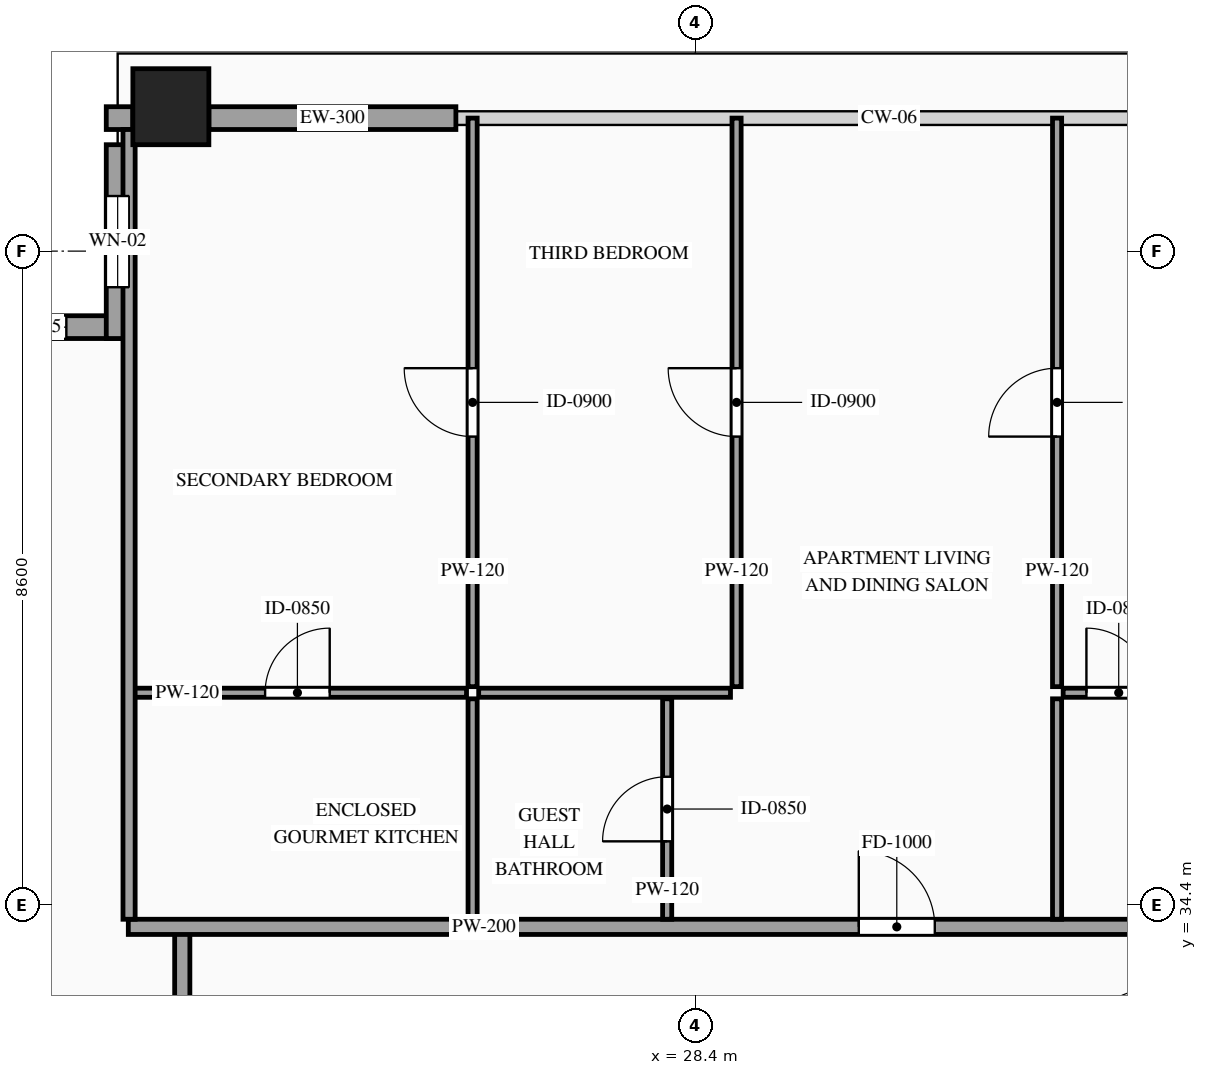
"""IFC4 building model, lengths in metres.
Left out: names, types, materials, properties, quantities, classifications, styles, units other than length and angle.
Written with IfcOpenShell. Run it as: python <this file> out.ifc"""

import sys

from ifc_helpers import new_model, si_unit, direction, frame, frame_2d, origin, origin_2d, place, context, subcontext, project, spatial, rectangle, hollow_rectangle, extrude, source, transform, mapped, element, fill, save


model = new_model("IFC4")
c1 = context("Model", 3, precision=1e-05, world=origin(), true_north=direction((0.0, 1.0)))
c2 = subcontext(c1, "Body", "Model", "MODEL_VIEW")
j1 = project(units=[si_unit("LENGTHUNIT", "METRE"), si_unit("PLANEANGLEUNIT", "RADIAN")], contexts=[c1])
p1 = place(None, origin())
s1 = spatial("IfcSite", under=j1, at=p1, CompositionType="ELEMENT")
p2 = place(p1, origin())
s2 = spatial("IfcBuilding", under=s1, at=p2, CompositionType="ELEMENT")
p3 = place(p2, frame((0.0, 0.0, 285.6)))
s3 = spatial("IfcBuildingStorey", under=s2, at=p3, CompositionType="ELEMENT", Elevation=285.6)
m1 = source(origin(), c2, "Body", "SweptSolid", [
    extrude(hollow_rectangle(XDim=1.0, YDim=1.0, WallThickness=0.048, at=origin_2d()), origin(), (0.0, 0.0, 1.0), 3.5),
])
p4 = place(p3, frame((21.5, 44.9, 0.0), z_axis=(0.0, 0.0, 1.0), x_axis=(1.0, 0.0, 0.0)))
e1 = element("IfcColumn", 1, at=p4, inside=s3, PredefinedType="COLUMN", context=c2, shape_type="MappedRepresentation", body=[
    mapped(m1, transform((0.0, 0.0, 0.0), scale=1.0)),
])
p5 = place(p3, frame((20.95, 42.0, 0.0), z_axis=(0.0, 0.0, 1.0), x_axis=(-1.0, 0.0, 0.0)))
e2 = element("IfcWall", 2, at=p5, inside=s3, PredefinedType="SOLIDWALL", context=c2, shape_type="SweptSolid", body=[
    extrude(rectangle(XDim=2.55, YDim=0.3, at=frame_2d((1.275, 0.0))), origin(), (0.0, 0.0, 1.0), 3.28),
])
p6 = place(p5, frame((0.825, 0.0, 0.85)))
e3 = element("IfcOpeningElement", 3, at=p6, cuts=e2, PredefinedType="OPENING", context=c2, shape_type="SweptSolid", body=[
    extrude(rectangle(XDim=0.9, YDim=1.5, at=frame_2d((0.45, 0.75))), frame((0.0, 0.165, 0.0), z_axis=(0.0, -1.0, 0.0), x_axis=(1.0, 0.0, 0.0)), (0.0, 0.0, 1.0), 0.33),
])
p7 = place(p3, frame((20.8, 44.4, 0.0), z_axis=(0.0, 0.0, 1.0), x_axis=(0.0, -1.0, 0.0)))
e4 = element("IfcWall", 4, at=p7, inside=s3, PredefinedType="SOLIDWALL", context=c2, shape_type="SweptSolid", body=[
    extrude(rectangle(XDim=2.55, YDim=0.3, at=frame_2d((1.275, 0.0))), origin(), (0.0, 0.0, 1.0), 3.28),
])
p8 = place(p7, frame((0.675, 0.0, 0.85)))
e5 = element("IfcOpeningElement", 5, at=p8, cuts=e4, PredefinedType="OPENING", context=c2, shape_type="SweptSolid", body=[
    extrude(rectangle(XDim=1.2, YDim=2.1, at=frame_2d((0.6, 1.05))), frame((0.0, 0.165, 0.0), z_axis=(0.0, -1.0, 0.0), x_axis=(1.0, 0.0, 0.0)), (0.0, 0.0, 1.0), 0.33),
])
m2 = source(origin(), c2, "Body", "SweptSolid", [
    extrude(rectangle(XDim=0.35, YDim=0.3, at=frame_2d((0.175, 0.0))), origin(), (0.0, 0.0, 1.0), 3.28),
])
p9 = place(p3, frame((20.65, 44.75, 0.0), z_axis=(0.0, 0.0, 1.0), x_axis=(1.0, 0.0, 0.0)))
e6 = element("IfcWall", 6, at=p9, inside=s3, PredefinedType="SOLIDWALL", context=c2, shape_type="MappedRepresentation", body=[
    mapped(m2, transform((0.0, 0.0, 0.0), scale=1.0)),
])
m3 = source(origin(), c2, "Body", "SweptSolid", [
    extrude(rectangle(XDim=3.25, YDim=0.3, at=frame_2d((1.625, 0.0))), origin(), (0.0, 0.0, 1.0), 2.885),
])
p10 = place(p3, frame((22.0, 44.75, 0.0), z_axis=(0.0, 0.0, 1.0), x_axis=(1.0, 0.0, 0.0)))
e7 = element("IfcWall", 7, at=p10, inside=s3, PredefinedType="SOLIDWALL", context=c2, shape_type="MappedRepresentation", body=[
    mapped(m3, transform((0.0, 0.0, 0.0), scale=1.0)),
])
m4 = source(origin(), c2, "Body", "SweptSolid", [
    extrude(rectangle(XDim=1.7, YDim=0.2, at=frame_2d((0.85, 0.0))), origin(), (0.0, 0.0, 1.0), 3.28),
])
p11 = place(p3, frame((21.65, 32.35, 0.0), z_axis=(0.0, 0.0, 1.0), x_axis=(0.0, 1.0, 0.0)))
e8 = element("IfcWall", 8, at=p11, inside=s3, PredefinedType="PARTITIONING", context=c2, shape_type="MappedRepresentation", body=[
    mapped(m4, transform((0.0, 0.0, 0.0), scale=1.0)),
])
p12 = place(p3, frame((20.94, 34.11, 0.0), z_axis=(0.0, 0.0, 1.0), x_axis=(1.0, 0.0, 0.0)))
e9 = element("IfcWall", 9, at=p12, inside=s3, PredefinedType="PARTITIONING", context=c2, shape_type="SweptSolid", body=[
    extrude(rectangle(XDim=16.622, YDim=0.2, at=frame_2d((8.311, 0.0))), origin(), (0.0, 0.0, 1.0), 3.28),
])
p13 = place(p12, frame((9.611, 0.0, 0.0)))
e10 = element("IfcOpeningElement", 10, at=p13, cuts=e9, PredefinedType="OPENING", context=c2, shape_type="SweptSolid", body=[
    extrude(rectangle(XDim=1.0, YDim=2.2, at=frame_2d((0.5, 1.1))), frame((0.0, 0.115, 0.0), z_axis=(0.0, -1.0, 0.0), x_axis=(1.0, 0.0, 0.0)), (0.0, 0.0, 1.0), 0.23),
])
p14 = place(p3, frame((20.94, 37.19, 0.0), z_axis=(0.0, 0.0, 1.0), x_axis=(1.0, 0.0, 0.0)))
e11 = element("IfcWall", 11, at=p14, inside=s3, PredefinedType="PARTITIONING", context=c2, shape_type="SweptSolid", body=[
    extrude(rectangle(XDim=4.45, YDim=0.12, at=frame_2d((2.225, 0.0))), origin(), (0.0, 0.0, 1.0), 3.28),
])
p15 = place(p14, frame((1.8, 0.0, 0.0)))
e12 = element("IfcOpeningElement", 12, at=p15, cuts=e11, PredefinedType="OPENING", context=c2, shape_type="SweptSolid", body=[
    extrude(rectangle(XDim=0.85, YDim=2.1, at=frame_2d((0.425, 1.05))), frame((0.0, 0.075, 0.0), z_axis=(0.0, -1.0, 0.0), x_axis=(1.0, 0.0, 0.0)), (0.0, 0.0, 1.0), 0.15),
])
m5 = source(origin(), c2, "Body", "SweptSolid", [
    extrude(rectangle(XDim=2.9, YDim=0.12, at=frame_2d((1.45, 0.0))), origin(), (0.0, 0.0, 1.0), 3.28),
])
p16 = place(p3, frame((25.47, 34.21, 0.0), z_axis=(0.0, 0.0, 1.0), x_axis=(0.0, 1.0, 0.0)))
e13 = element("IfcWall", 13, at=p16, inside=s3, PredefinedType="PARTITIONING", context=c2, shape_type="MappedRepresentation", body=[
    mapped(m5, transform((0.0, 0.0, 0.0), scale=1.0)),
])
p17 = place(p3, frame((28.03, 34.21, 0.0), z_axis=(0.0, 0.0, 1.0), x_axis=(0.0, 1.0, 0.0)))
e14 = element("IfcWall", 14, at=p17, inside=s3, PredefinedType="PARTITIONING", context=c2, shape_type="SweptSolid", body=[
    extrude(rectangle(XDim=2.9, YDim=0.12, at=frame_2d((1.45, 0.0))), origin(), (0.0, 0.0, 1.0), 3.28),
])
p18 = place(p17, frame((1.025, 0.0, 0.0)))
e15 = element("IfcOpeningElement", 15, at=p18, cuts=e14, PredefinedType="OPENING", context=c2, shape_type="SweptSolid", body=[
    extrude(rectangle(XDim=0.85, YDim=2.1, at=frame_2d((0.425, 1.05))), frame((0.0, 0.075, 0.0), z_axis=(0.0, -1.0, 0.0), x_axis=(1.0, 0.0, 0.0)), (0.0, 0.0, 1.0), 0.15),
])
p19 = place(p3, frame((33.16, 34.21, 0.0), z_axis=(0.0, 0.0, 1.0), x_axis=(0.0, 1.0, 0.0)))
e16 = element("IfcWall", 16, at=p19, inside=s3, PredefinedType="PARTITIONING", context=c2, shape_type="MappedRepresentation", body=[
    mapped(m5, transform((0.0, 0.0, 0.0), scale=1.0)),
])
p20 = place(p3, frame((25.47, 37.27, 0.0), z_axis=(0.0, 0.0, 1.0), x_axis=(0.0, 1.0, 0.0)))
e17 = element("IfcWall", 17, at=p20, inside=s3, PredefinedType="PARTITIONING", context=c2, shape_type="SweptSolid", body=[
    extrude(rectangle(XDim=7.48, YDim=0.12, at=frame_2d((3.74, 0.0))), origin(), (0.0, 0.0, 1.0), 3.28),
])
p21 = place(p20, frame((3.29, 0.0, 0.0)))
e18 = element("IfcOpeningElement", 18, at=p21, cuts=e17, PredefinedType="OPENING", context=c2, shape_type="SweptSolid", body=[
    extrude(rectangle(XDim=0.9, YDim=2.15, at=frame_2d((0.45, 1.075))), frame((0.0, 0.075, 0.0), z_axis=(0.0, -1.0, 0.0), x_axis=(1.0, 0.0, 0.0)), (0.0, 0.0, 1.0), 0.15),
])
p22 = place(p3, frame((33.24, 37.19, 0.0), z_axis=(0.0, 0.0, 1.0), x_axis=(1.0, 0.0, 0.0)))
e19 = element("IfcWall", 19, at=p22, inside=s3, PredefinedType="PARTITIONING", context=c2, shape_type="SweptSolid", body=[
    extrude(rectangle(XDim=4.322, YDim=0.12, at=frame_2d((2.161, 0.0))), origin(), (0.0, 0.0, 1.0), 3.28),
])
p23 = place(p22, frame((2.547, 0.0, 0.0)))
e20 = element("IfcOpeningElement", 20, at=p23, cuts=e19, PredefinedType="OPENING", context=c2, shape_type="SweptSolid", body=[
    extrude(rectangle(XDim=0.85, YDim=2.1, at=frame_2d((0.425, 1.05))), frame((0.0, 0.075, 0.0), z_axis=(0.0, -1.0, 0.0), x_axis=(1.0, 0.0, 0.0)), (0.0, 0.0, 1.0), 0.15),
])
p24 = place(p22, frame((0.306, 0.0, 0.0)))
e21 = element("IfcOpeningElement", 21, at=p24, cuts=e19, PredefinedType="OPENING", context=c2, shape_type="SweptSolid", body=[
    extrude(rectangle(XDim=0.85, YDim=2.1, at=frame_2d((0.425, 1.05))), frame((0.0, 0.075, 0.0), z_axis=(0.0, -1.0, 0.0), x_axis=(1.0, 0.0, 0.0)), (0.0, 0.0, 1.0), 0.15),
])
p25 = place(p3, frame((33.16, 37.27, 0.0), z_axis=(0.0, 0.0, 1.0), x_axis=(0.0, 1.0, 0.0)))
e22 = element("IfcWall", 22, at=p25, inside=s3, PredefinedType="PARTITIONING", context=c2, shape_type="SweptSolid", body=[
    extrude(rectangle(XDim=7.48, YDim=0.12, at=frame_2d((3.74, 0.0))), origin(), (0.0, 0.0, 1.0), 3.28),
])
p26 = place(p25, frame((3.29, 0.0, 0.0)))
e23 = element("IfcOpeningElement", 23, at=p26, cuts=e22, PredefinedType="OPENING", context=c2, shape_type="SweptSolid", body=[
    extrude(rectangle(XDim=0.9, YDim=2.15, at=frame_2d((0.45, 1.075))), frame((0.0, 0.075, 0.0), z_axis=(0.0, -1.0, 0.0), x_axis=(1.0, 0.0, 0.0)), (0.0, 0.0, 1.0), 0.15),
])
m6 = source(origin(), c2, "Body", "SweptSolid", [
    extrude(rectangle(XDim=3.313, YDim=0.12, at=frame_2d((1.656, 0.0))), origin(), (0.0, 0.0, 1.0), 3.28),
])
p27 = place(p3, frame((25.55, 37.19, 0.0), z_axis=(0.0, 0.0, 1.0), x_axis=(1.0, 0.0, 0.0)))
e24 = element("IfcWall", 24, at=p27, inside=s3, PredefinedType="PARTITIONING", context=c2, shape_type="MappedRepresentation", body=[
    mapped(m6, transform((0.0, 0.0, 0.0), scale=1.0)),
])
p28 = place(p3, frame((28.943, 37.27, 0.0), z_axis=(0.0, 0.0, 1.0), x_axis=(0.0, 1.0, 0.0)))
e25 = element("IfcWall", 25, at=p28, inside=s3, PredefinedType="PARTITIONING", context=c2, shape_type="SweptSolid", body=[
    extrude(rectangle(XDim=7.48, YDim=0.12, at=frame_2d((3.74, 0.0))), origin(), (0.0, 0.0, 1.0), 3.28),
])
p29 = place(p28, frame((3.29, 0.0, 0.0)))
e26 = element("IfcOpeningElement", 26, at=p29, cuts=e25, PredefinedType="OPENING", context=c2, shape_type="SweptSolid", body=[
    extrude(rectangle(XDim=0.9, YDim=2.15, at=frame_2d((0.45, 1.075))), frame((0.0, 0.075, 0.0), z_axis=(0.0, -1.0, 0.0), x_axis=(1.0, 0.0, 0.0)), (0.0, 0.0, 1.0), 0.15),
])
m7 = source(origin(), c2, "Body", "SweptSolid", [
    extrude(rectangle(XDim=10.39, YDim=0.16, at=frame_2d((5.195, 0.0))), origin(), (0.0, 0.0, 1.0), 3.28),
])
p30 = place(p3, frame((20.95, 34.21, 0.0), z_axis=(0.0, 0.0, 1.0), x_axis=(0.0, 1.0, 0.0)))
e27 = element("IfcWall", 27, at=p30, inside=s3, PredefinedType="PARTITIONING", context=c2, shape_type="MappedRepresentation", body=[
    mapped(m7, transform((0.0, 0.0, 0.0), scale=1.0)),
])
m8 = source(origin(), c2, "Body", "SweptSolid", [
    extrude(rectangle(XDim=0.9, YDim=1.5, at=frame_2d((0.45, 0.75))), frame((0.0, 0.03, 0.0), z_axis=(0.0, -1.0, 0.0), x_axis=(1.0, 0.0, 0.0)), (0.0, 0.0, 1.0), 0.06),
])
p31 = place(p6, origin())
e28 = element("IfcWindow", 28, at=p31, inside=s3, PartitioningType="SINGLE_PANEL", PredefinedType="WINDOW", context=c2, shape_type="MappedRepresentation", body=[
    mapped(m8, transform((0.0, 0.0, 0.0), scale=1.0)),
])
fill(e3, e28)
m9 = source(origin(), c2, "Body", "SweptSolid", [
    extrude(rectangle(XDim=1.2, YDim=2.1, at=frame_2d((0.6, 1.05))), frame((0.0, 0.03, 0.0), z_axis=(0.0, -1.0, 0.0), x_axis=(1.0, 0.0, 0.0)), (0.0, 0.0, 1.0), 0.06),
])
p32 = place(p8, origin())
e29 = element("IfcWindow", 29, at=p32, inside=s3, PartitioningType="SINGLE_PANEL", PredefinedType="WINDOW", context=c2, shape_type="MappedRepresentation", body=[
    mapped(m9, transform((0.0, 0.0, 0.0), scale=1.0)),
])
fill(e5, e29)
m10 = source(origin(), c2, "Body", "SweptSolid", [
    extrude(rectangle(XDim=1.0, YDim=2.2, at=frame_2d((0.5, 1.1))), frame((0.0, 0.025, 0.0), z_axis=(0.0, -1.0, 0.0), x_axis=(1.0, 0.0, 0.0)), (0.0, 0.0, 1.0), 0.05),
])
p33 = place(p13, origin())
e30 = element("IfcDoor", 30, at=p33, inside=s3, OperationType="SINGLE_SWING_LEFT", PredefinedType="DOOR", context=c2, shape_type="MappedRepresentation", body=[
    mapped(m10, transform((0.0, 0.0, 0.0), scale=1.0)),
])
fill(e10, e30)
m11 = source(origin(), c2, "Body", "SweptSolid", [
    extrude(rectangle(XDim=0.85, YDim=2.1, at=frame_2d((0.425, 1.05))), frame((0.0, 0.025, 0.0), z_axis=(0.0, -1.0, 0.0), x_axis=(1.0, 0.0, 0.0)), (0.0, 0.0, 1.0), 0.05),
])
p34 = place(p15, origin())
e31 = element("IfcDoor", 31, at=p34, inside=s3, OperationType="SINGLE_SWING_RIGHT", PredefinedType="DOOR", context=c2, shape_type="MappedRepresentation", body=[
    mapped(m11, transform((0.0, 0.0, 0.0), scale=1.0)),
])
fill(e12, e31)
p35 = place(p18, origin())
e32 = element("IfcDoor", 32, at=p35, inside=s3, OperationType="SINGLE_SWING_LEFT", PredefinedType="DOOR", context=c2, shape_type="MappedRepresentation", body=[
    mapped(m11, transform((0.0, 0.0, 0.0), scale=1.0)),
])
fill(e15, e32)
p36 = place(p24, origin())
e33 = element("IfcDoor", 33, at=p36, inside=s3, OperationType="SINGLE_SWING_LEFT", PredefinedType="DOOR", context=c2, shape_type="MappedRepresentation", body=[
    mapped(m11, transform((0.0, 0.0, 0.0), scale=1.0)),
])
fill(e21, e33)
m12 = source(origin(), c2, "Body", "SweptSolid", [
    extrude(rectangle(XDim=0.9, YDim=2.15, at=frame_2d((0.45, 1.075))), frame((0.0, 0.025, 0.0), z_axis=(0.0, -1.0, 0.0), x_axis=(1.0, 0.0, 0.0)), (0.0, 0.0, 1.0), 0.05),
])
p37 = place(p21, origin())
e34 = element("IfcDoor", 34, at=p37, inside=s3, OperationType="SINGLE_SWING_RIGHT", PredefinedType="DOOR", context=c2, shape_type="MappedRepresentation", body=[
    mapped(m12, transform((0.0, 0.0, 0.0), scale=1.0)),
])
fill(e18, e34)
p38 = place(p26, origin())
e35 = element("IfcDoor", 35, at=p38, inside=s3, OperationType="SINGLE_SWING_LEFT", PredefinedType="DOOR", context=c2, shape_type="MappedRepresentation", body=[
    mapped(m12, transform((0.0, 0.0, 0.0), scale=1.0)),
])
fill(e23, e35)
p39 = place(p29, origin())
e36 = element("IfcDoor", 36, at=p39, inside=s3, OperationType="SINGLE_SWING_RIGHT", PredefinedType="DOOR", context=c2, shape_type="MappedRepresentation", body=[
    mapped(m12, transform((0.0, 0.0, 0.0), scale=1.0)),
])
fill(e26, e36)
save(model, sys.argv[1])
